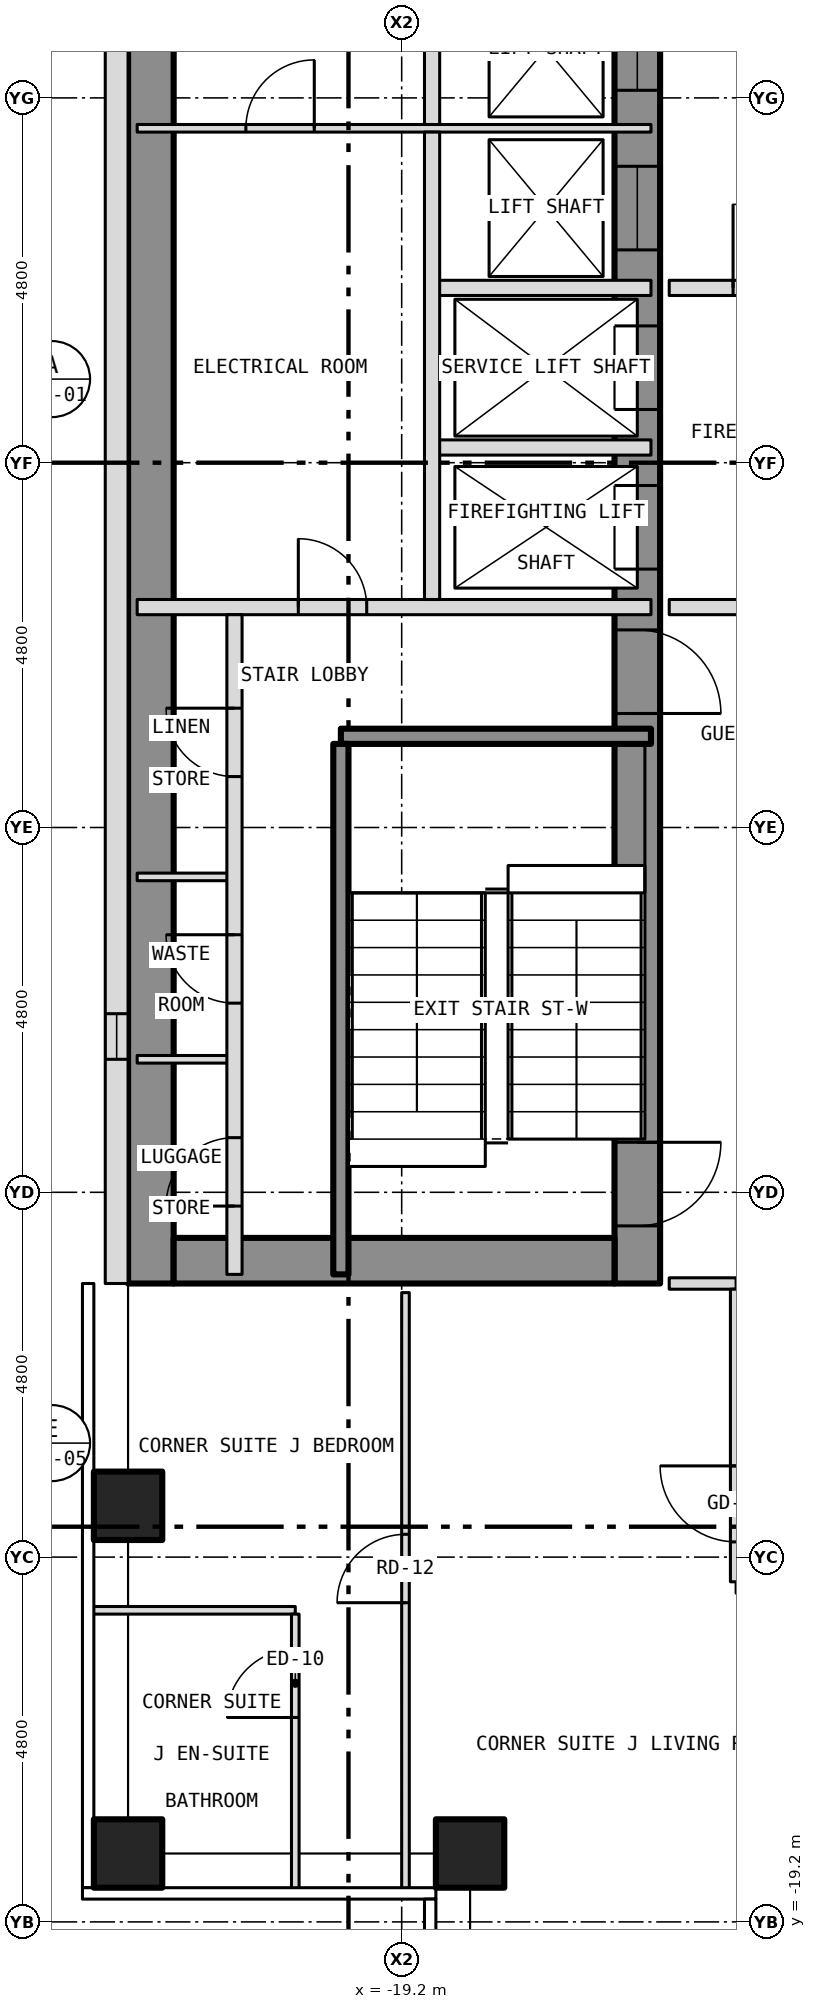
"""IFC4 building model, lengths in metres.
Left out: names, types, materials, properties, quantities, classifications, styles, units other than length and angle.
Written with IfcOpenShell. Run it as: python <this file> out.ifc"""

import sys

from ifc_helpers import new_model, si_unit, direction, frame, frame_2d, origin, origin_2d, place, context, subcontext, project, spatial, rectangle, hollow_rectangle, extrude, element, fill, save


model = new_model("IFC4")
c1 = context("Model", 3, precision=1e-05, world=origin(), true_north=direction((0.0, 1.0)))
c2 = subcontext(c1, "Body", "Model", "MODEL_VIEW")
j1 = project(units=[si_unit("LENGTHUNIT", "METRE"), si_unit("PLANEANGLEUNIT", "RADIAN")], contexts=[c1])
p1 = place(None, origin())
s1 = spatial("IfcSite", under=j1, at=p1, CompositionType="ELEMENT")
p2 = place(p1, origin())
s2 = spatial("IfcBuilding", under=s1, at=p2, CompositionType="ELEMENT")
p3 = place(p2, frame((0.0, 0.0, 96.0)))
s3 = spatial("IfcBuildingStorey", under=s2, at=p3, CompositionType="ELEMENT", Elevation=96.0)
for number, where, z_axis, x_axis in (
    (1, (-22.8, -18.3, -0.15), (0.0, 0.0, 1.0), (1.0, 0.0, 0.0)),
    (2, (-22.8, -13.725, -0.15), (0.0, 0.0, 1.0), (1.0, 0.0, 0.0)),
    (3, (-18.3, -18.3, -0.15), (0.0, 0.0, 1.0), (1.0, 0.0, 0.0)),
):
    element("IfcColumn", number, at=place(p3, frame(where, z_axis=z_axis, x_axis=x_axis)), inside=s3, PredefinedType="COLUMN", context=c2, shape_type="SweptSolid", body=[
        extrude(hollow_rectangle(XDim=0.9, YDim=0.9, WallThickness=0.05, at=origin_2d()), origin(), (0.0, 0.0, 1.0), 3.5),
    ])
p4 = place(p3, frame((-16.1, -10.8, 0.0), z_axis=(0.0, 0.0, 1.0), x_axis=(0.0, 1.0, 0.0)))
e4 = element("IfcWall", 4, at=p4, inside=s3, PredefinedType="SHEAR", context=c2, shape_type="SweptSolid", body=[
    extrude(rectangle(XDim=21.6, YDim=0.6, at=frame_2d((10.8, 0.0))), origin(), (0.0, 0.0, 1.0), 3.25),
])
p5 = place(p4, frame((9.4, 0.0, 0.0)))
e5 = element("IfcOpeningElement", 5, at=p5, cuts=e4, PredefinedType="OPENING", context=c2, shape_type="SweptSolid", body=[
    extrude(rectangle(XDim=1.1, YDim=2.1, at=frame_2d((0.55, 1.05))), frame((0.0, 0.312, 0.0), z_axis=(0.0, -1.0, 0.0), x_axis=(1.0, 0.0, 0.0)), (0.0, 0.0, 1.0), 0.624),
])
p6 = place(p4, frame((11.5, 0.0, 0.0)))
e6 = element("IfcOpeningElement", 6, at=p6, cuts=e4, PredefinedType="OPENING", context=c2, shape_type="SweptSolid", body=[
    extrude(rectangle(XDim=1.1, YDim=2.1, at=frame_2d((0.55, 1.05))), frame((0.0, 0.312, 0.0), z_axis=(0.0, -1.0, 0.0), x_axis=(1.0, 0.0, 0.0)), (0.0, 0.0, 1.0), 0.624),
])
p7 = place(p4, frame((13.6, 0.0, 0.0)))
e7 = element("IfcOpeningElement", 7, at=p7, cuts=e4, PredefinedType="OPENING", context=c2, shape_type="SweptSolid", body=[
    extrude(rectangle(XDim=1.1, YDim=2.1, at=frame_2d((0.55, 1.05))), frame((0.0, 0.312, 0.0), z_axis=(0.0, -1.0, 0.0), x_axis=(1.0, 0.0, 0.0)), (0.0, 0.0, 1.0), 0.624),
])
p8 = place(p4, frame((15.7, 0.0, 0.0)))
e8 = element("IfcOpeningElement", 8, at=p8, cuts=e4, PredefinedType="OPENING", context=c2, shape_type="SweptSolid", body=[
    extrude(rectangle(XDim=1.1, YDim=2.1, at=frame_2d((0.55, 1.05))), frame((0.0, 0.312, 0.0), z_axis=(0.0, -1.0, 0.0), x_axis=(1.0, 0.0, 0.0)), (0.0, 0.0, 1.0), 0.624),
])
p9 = place(p4, frame((17.8, 0.0, 0.0)))
e9 = element("IfcOpeningElement", 9, at=p9, cuts=e4, PredefinedType="OPENING", context=c2, shape_type="SweptSolid", body=[
    extrude(rectangle(XDim=1.1, YDim=2.1, at=frame_2d((0.55, 1.05))), frame((0.0, 0.312, 0.0), z_axis=(0.0, -1.0, 0.0), x_axis=(1.0, 0.0, 0.0)), (0.0, 0.0, 1.0), 0.624),
])
p10 = place(p4, frame((0.758, 0.0, 0.0)))
e10 = element("IfcOpeningElement", 10, at=p10, cuts=e4, PredefinedType="OPENING", context=c2, shape_type="SweptSolid", body=[
    extrude(rectangle(XDim=1.1, YDim=2.1, at=frame_2d((0.55, 1.05))), frame((0.0, 0.312, 0.0), z_axis=(0.0, -1.0, 0.0), x_axis=(1.0, 0.0, 0.0)), (0.0, 0.0, 1.0), 0.624),
])
p11 = place(p4, frame((7.5, 0.0, 0.0)))
e11 = element("IfcOpeningElement", 11, at=p11, cuts=e4, PredefinedType="OPENING", context=c2, shape_type="SweptSolid", body=[
    extrude(rectangle(XDim=1.1, YDim=2.1, at=frame_2d((0.55, 1.05))), frame((0.0, 0.312, 0.0), z_axis=(0.0, -1.0, 0.0), x_axis=(1.0, 0.0, 0.0)), (0.0, 0.0, 1.0), 0.624),
])
p12 = place(p3, frame((-22.5, -10.8, 0.0), z_axis=(0.0, 0.0, 1.0), x_axis=(0.0, 1.0, 0.0)))
e12 = element("IfcWall", 12, at=p12, inside=s3, PredefinedType="SHEAR", context=c2, shape_type="SweptSolid", body=[
    extrude(rectangle(XDim=21.6, YDim=0.6, at=frame_2d((10.8, 0.0))), origin(), (0.0, 0.0, 1.0), 3.25),
])
p13 = place(p3, frame((-22.2, -10.5, 0.0), z_axis=(0.0, 0.0, 1.0), x_axis=(1.0, 0.0, 0.0)))
e13 = element("IfcWall", 13, at=p13, inside=s3, PredefinedType="SHEAR", context=c2, shape_type="SweptSolid", body=[
    extrude(rectangle(XDim=5.8, YDim=0.6, at=frame_2d((2.9, 0.0))), origin(), (0.0, 0.0, 1.0), 3.25),
])
p14 = place(p3, frame((-22.95, 10.8, 0.0), z_axis=(0.0, 0.0, 1.0), x_axis=(0.0, -1.0, 0.0)))
e14 = element("IfcWall", 14, at=p14, inside=s3, PredefinedType="SOLIDWALL", context=c2, shape_type="SweptSolid", body=[
    extrude(rectangle(XDim=21.6, YDim=0.3, at=frame_2d((10.8, 0.0))), origin(), (0.0, 0.0, 1.0), 3.5),
])
p15 = place(p14, frame((18.05, 0.0, 1.0)))
e15 = element("IfcOpeningElement", 15, at=p15, cuts=e14, PredefinedType="OPENING", context=c2, shape_type="SweptSolid", body=[
    extrude(rectangle(XDim=0.6, YDim=1.5, at=frame_2d((0.3, 0.75))), frame((0.0, 0.162, 0.0), z_axis=(0.0, -1.0, 0.0), x_axis=(1.0, 0.0, 0.0)), (0.0, 0.0, 1.0), 0.324),
])
p16 = place(p3, frame((-23.28, -15.1, 0.0), z_axis=(0.0, 0.0, 1.0), x_axis=(1.0, 0.0, 0.0)))
e16 = element("IfcWall", 16, at=p16, inside=s3, PredefinedType="PARTITIONING", context=c2, shape_type="SweptSolid", body=[
    extrude(rectangle(XDim=2.68, YDim=0.1, at=frame_2d((1.34, 0.0))), origin(), (0.0, 0.0, 1.0), 3.35),
])
p17 = place(p3, frame((-15.68, -10.8, 0.0), z_axis=(0.0, 0.0, 1.0), x_axis=(1.0, 0.0, 0.0)))
e17 = element("IfcWall", 17, at=p17, inside=s3, PredefinedType="PARTITIONING", context=c2, shape_type="SweptSolid", body=[
    extrude(rectangle(XDim=0.88, YDim=0.15, at=frame_2d((0.44, 0.0))), origin(), (0.0, 0.0, 1.0), 3.35),
])
for number, where, z_axis, x_axis in (
    (18, (-22.68, -7.85, 0.0), (0.0, 0.0, 1.0), (1.0, 0.0, 0.0)),
    (19, (-22.68, -5.45, 0.0), (0.0, 0.0, 1.0), (1.0, 0.0, 0.0)),
):
    element("IfcWall", number, at=place(p3, frame(where, z_axis=z_axis, x_axis=x_axis)), inside=s3, PredefinedType="PARTITIONING", context=c2, shape_type="SweptSolid", body=[
        extrude(rectangle(XDim=1.28, YDim=0.1, at=frame_2d((0.64, 0.0))), origin(), (0.0, 0.0, 1.0), 3.25),
    ])
p18 = place(p3, frame((-20.0, -3.6, 0.0), z_axis=(0.0, 0.0, 1.0), x_axis=(1.0, 0.0, 0.0)))
e20 = element("IfcWall", 20, at=p18, inside=s3, PredefinedType="SHEAR", context=c2, shape_type="SweptSolid", body=[
    extrude(rectangle(XDim=4.08, YDim=0.2, at=frame_2d((2.04, 0.0))), origin(), (0.0, 0.0, 1.0), 3.25),
])
p19 = place(p3, frame((-22.68, -1.9, 0.0), z_axis=(0.0, 0.0, 1.0), x_axis=(1.0, 0.0, 0.0)))
e21 = element("IfcWall", 21, at=p19, inside=s3, PredefinedType="PARTITIONING", context=c2, shape_type="SweptSolid", body=[
    extrude(rectangle(XDim=6.76, YDim=0.2, at=frame_2d((3.38, 0.0))), origin(), (0.0, 0.0, 1.0), 3.25),
])
p20 = place(p19, frame((2.12, 0.0, 0.0)))
e22 = element("IfcOpeningElement", 22, at=p20, cuts=e21, PredefinedType="OPENING", context=c2, shape_type="SweptSolid", body=[
    extrude(rectangle(XDim=0.9, YDim=2.1, at=frame_2d((0.45, 1.05))), frame((0.0, 0.112, 0.0), z_axis=(0.0, -1.0, 0.0), x_axis=(1.0, 0.0, 0.0)), (0.0, 0.0, 1.0), 0.224),
])
p21 = place(p3, frame((-15.68, -1.9, 0.0), z_axis=(0.0, 0.0, 1.0), x_axis=(1.0, 0.0, 0.0)))
e23 = element("IfcWall", 23, at=p21, inside=s3, PredefinedType="PARTITIONING", context=c2, shape_type="SweptSolid", body=[
    extrude(rectangle(XDim=3.28, YDim=0.2, at=frame_2d((1.64, 0.0))), origin(), (0.0, 0.0, 1.0), 3.35),
])
p22 = place(p21, frame((0.94, 0.0, 0.0)))
e24 = element("IfcOpeningElement", 24, at=p22, cuts=e23, PredefinedType="OPENING", context=c2, shape_type="SweptSolid", body=[
    extrude(rectangle(XDim=1.1, YDim=2.1, at=frame_2d((0.55, 1.05))), frame((0.0, 0.112, 0.0), z_axis=(0.0, -1.0, 0.0), x_axis=(1.0, 0.0, 0.0)), (0.0, 0.0, 1.0), 0.224),
])
for number, where, z_axis, x_axis in (
    (25, (-18.8, 0.2, 0.0), (0.0, 0.0, 1.0), (1.0, 0.0, 0.0)),
    (26, (-18.8, 2.3, 0.0), (0.0, 0.0, 1.0), (1.0, 0.0, 0.0)),
):
    element("IfcWall", number, at=place(p3, frame(where, z_axis=z_axis, x_axis=x_axis)), inside=s3, PredefinedType="PARTITIONING", context=c2, shape_type="SweptSolid", body=[
        extrude(rectangle(XDim=2.88, YDim=0.2, at=frame_2d((1.44, 0.0))), origin(), (0.0, 0.0, 1.0), 3.25),
    ])
p23 = place(p3, frame((-15.68, 2.3, 0.0), z_axis=(0.0, 0.0, 1.0), x_axis=(1.0, 0.0, 0.0)))
e27 = element("IfcWall", 27, at=p23, inside=s3, PredefinedType="PARTITIONING", context=c2, shape_type="SweptSolid", body=[
    extrude(rectangle(XDim=3.28, YDim=0.2, at=frame_2d((1.64, 0.0))), origin(), (0.0, 0.0, 1.0), 3.35),
])
p24 = place(p23, frame((0.84, 0.0, 0.0)))
e28 = element("IfcOpeningElement", 28, at=p24, cuts=e27, PredefinedType="OPENING", context=c2, shape_type="SweptSolid", body=[
    extrude(rectangle(XDim=1.1, YDim=2.1, at=frame_2d((0.55, 1.05))), frame((0.0, 0.112, 0.0), z_axis=(0.0, -1.0, 0.0), x_axis=(1.0, 0.0, 0.0)), (0.0, 0.0, 1.0), 0.224),
])
p25 = place(p3, frame((-22.68, 4.4, 0.0), z_axis=(0.0, 0.0, 1.0), x_axis=(1.0, 0.0, 0.0)))
e29 = element("IfcWall", 29, at=p25, inside=s3, PredefinedType="PARTITIONING", context=c2, shape_type="SweptSolid", body=[
    extrude(rectangle(XDim=6.76, YDim=0.1, at=frame_2d((3.38, 0.0))), origin(), (0.0, 0.0, 1.0), 3.25),
])
p26 = place(p25, frame((1.43, 0.0, 0.0)))
e30 = element("IfcOpeningElement", 30, at=p26, cuts=e29, PredefinedType="OPENING", context=c2, shape_type="SweptSolid", body=[
    extrude(rectangle(XDim=0.9, YDim=2.1, at=frame_2d((0.45, 1.05))), frame((0.0, 0.062, 0.0), z_axis=(0.0, -1.0, 0.0), x_axis=(1.0, 0.0, 0.0)), (0.0, 0.0, 1.0), 0.124),
])
p27 = place(p3, frame((-21.4, -10.68, 0.0), z_axis=(0.0, 0.0, 1.0), x_axis=(0.0, 1.0, 0.0)))
e31 = element("IfcWall", 31, at=p27, inside=s3, PredefinedType="PARTITIONING", context=c2, shape_type="SweptSolid", body=[
    extrude(rectangle(XDim=8.68, YDim=0.2, at=frame_2d((4.34, 0.0))), origin(), (0.0, 0.0, 1.0), 3.25),
])
p28 = place(p27, frame((0.899, 0.0, 0.0)))
e32 = element("IfcOpeningElement", 32, at=p28, cuts=e31, PredefinedType="OPENING", context=c2, shape_type="SweptSolid", body=[
    extrude(rectangle(XDim=0.9, YDim=2.1, at=frame_2d((0.45, 1.05))), frame((0.0, 0.112, 0.0), z_axis=(0.0, -1.0, 0.0), x_axis=(1.0, 0.0, 0.0)), (0.0, 0.0, 1.0), 0.224),
])
p29 = place(p27, frame((3.569, 0.0, 0.0)))
e33 = element("IfcOpeningElement", 33, at=p29, cuts=e31, PredefinedType="OPENING", context=c2, shape_type="SweptSolid", body=[
    extrude(rectangle(XDim=0.9, YDim=2.1, at=frame_2d((0.45, 1.05))), frame((0.0, 0.112, 0.0), z_axis=(0.0, -1.0, 0.0), x_axis=(1.0, 0.0, 0.0)), (0.0, 0.0, 1.0), 0.224),
])
p30 = place(p27, frame((6.55, 0.0, 0.0)))
e34 = element("IfcOpeningElement", 34, at=p30, cuts=e31, PredefinedType="OPENING", context=c2, shape_type="SweptSolid", body=[
    extrude(rectangle(XDim=0.9, YDim=2.1, at=frame_2d((0.45, 1.05))), frame((0.0, 0.112, 0.0), z_axis=(0.0, -1.0, 0.0), x_axis=(1.0, 0.0, 0.0)), (0.0, 0.0, 1.0), 0.224),
])
p31 = place(p3, frame((-20.6, -18.78, 0.0), z_axis=(0.0, 0.0, 1.0), x_axis=(0.0, 1.0, 0.0)))
e35 = element("IfcWall", 35, at=p31, inside=s3, PredefinedType="PARTITIONING", context=c2, shape_type="SweptSolid", body=[
    extrude(rectangle(XDim=3.63, YDim=0.1, at=frame_2d((1.815, 0.0))), origin(), (0.0, 0.0, 1.0), 3.35),
])
p32 = place(p31, frame((2.27, 0.0, 0.0)))
e36 = element("IfcOpeningElement", 36, at=p32, cuts=e35, PredefinedType="OPENING", context=c2, shape_type="SweptSolid", body=[
    extrude(rectangle(XDim=0.9, YDim=2.1, at=frame_2d((0.45, 1.05))), frame((0.0, 0.062, 0.0), z_axis=(0.0, -1.0, 0.0), x_axis=(1.0, 0.0, 0.0)), (0.0, 0.0, 1.0), 0.124),
])
p33 = place(p3, frame((-20.0, -10.68, 0.0), z_axis=(0.0, 0.0, 1.0), x_axis=(0.0, 1.0, 0.0)))
e37 = element("IfcWall", 37, at=p33, inside=s3, PredefinedType="SHEAR", context=c2, shape_type="SweptSolid", body=[
    extrude(rectangle(XDim=6.98, YDim=0.2, at=frame_2d((3.49, 0.0))), origin(), (0.0, 0.0, 1.0), 3.25),
])
p34 = place(p3, frame((-19.15, -18.78, 0.0), z_axis=(0.0, 0.0, 1.0), x_axis=(0.0, 1.0, 0.0)))
e38 = element("IfcWall", 38, at=p34, inside=s3, PredefinedType="PARTITIONING", context=c2, shape_type="SweptSolid", body=[
    extrude(rectangle(XDim=7.86, YDim=0.1, at=frame_2d((3.93, 0.0))), origin(), (0.0, 0.0, 1.0), 2.817),
])
p35 = place(p34, frame((3.78, 0.0, 0.0)))
e39 = element("IfcOpeningElement", 39, at=p35, cuts=e38, PredefinedType="OPENING", context=c2, shape_type="SweptSolid", body=[
    extrude(rectangle(XDim=0.9, YDim=2.1, at=frame_2d((0.45, 1.05))), frame((0.0, 0.062, 0.0), z_axis=(0.0, -1.0, 0.0), x_axis=(1.0, 0.0, 0.0)), (0.0, 0.0, 1.0), 0.124),
])
p36 = place(p3, frame((-18.8, -1.8, 0.0), z_axis=(0.0, 0.0, 1.0), x_axis=(0.0, 1.0, 0.0)))
e40 = element("IfcWall", 40, at=p36, inside=s3, PredefinedType="PARTITIONING", context=c2, shape_type="SweptSolid", body=[
    extrude(rectangle(XDim=6.15, YDim=0.2, at=frame_2d((3.075, 0.0))), origin(), (0.0, 0.0, 1.0), 3.25),
])
p37 = place(p3, frame((-18.8, 4.45, 0.0), z_axis=(0.0, 0.0, 1.0), x_axis=(0.0, 1.0, 0.0)))
e41 = element("IfcWall", 41, at=p37, inside=s3, PredefinedType="PARTITIONING", context=c2, shape_type="SweptSolid", body=[
    extrude(rectangle(XDim=6.23, YDim=0.2, at=frame_2d((3.115, 0.0))), origin(), (0.0, 0.0, 1.0), 3.25),
])
p38 = place(p3, frame((-14.8, -14.725, 0.0), z_axis=(0.0, 0.0, 1.0), x_axis=(0.0, 1.0, 0.0)))
e42 = element("IfcWall", 42, at=p38, inside=s3, PredefinedType="PARTITIONING", context=c2, shape_type="SweptSolid", body=[
    extrude(rectangle(XDim=3.85, YDim=0.15, at=frame_2d((1.925, 0.0))), origin(), (0.0, 0.0, 1.0), 3.35),
])
p39 = place(p38, frame((0.525, 0.0, 0.0)))
e43 = element("IfcOpeningElement", 43, at=p39, cuts=e42, PredefinedType="OPENING", context=c2, shape_type="SweptSolid", body=[
    extrude(rectangle(XDim=1.0, YDim=2.1, at=frame_2d((0.5, 1.05))), frame((0.0, 0.087, 0.0), z_axis=(0.0, -1.0, 0.0), x_axis=(1.0, 0.0, 0.0)), (0.0, 0.0, 1.0), 0.174),
])
p40 = place(p15, origin())
e44 = element("IfcWindow", 44, at=p40, inside=s3, PartitioningType="SINGLE_PANEL", PredefinedType="WINDOW", context=c2, shape_type="SweptSolid", body=[
    extrude(rectangle(XDim=0.6, YDim=1.5, at=frame_2d((0.3, 0.75))), frame((0.0, -0.06, 0.0), z_axis=(0.0, -1.0, 0.0), x_axis=(1.0, 0.0, 0.0)), (0.0, 0.0, 1.0), 0.06),
])
fill(e15, e44)
p41 = place(p5, origin())
e45 = element("IfcDoor", 45, at=p41, inside=s3, OperationType="SLIDING_TO_LEFT", PredefinedType="DOOR", context=c2, shape_type="SweptSolid", body=[
    extrude(rectangle(XDim=1.1, YDim=2.1, at=frame_2d((0.55, 1.05))), frame((0.0, 0.025, 0.0), z_axis=(0.0, -1.0, 0.0), x_axis=(1.0, 0.0, 0.0)), (0.0, 0.0, 1.0), 0.05),
])
fill(e5, e45)
p42 = place(p6, origin())
e46 = element("IfcDoor", 46, at=p42, inside=s3, OperationType="SLIDING_TO_LEFT", PredefinedType="DOOR", context=c2, shape_type="SweptSolid", body=[
    extrude(rectangle(XDim=1.1, YDim=2.1, at=frame_2d((0.55, 1.05))), frame((0.0, 0.025, 0.0), z_axis=(0.0, -1.0, 0.0), x_axis=(1.0, 0.0, 0.0)), (0.0, 0.0, 1.0), 0.05),
])
fill(e6, e46)
p43 = place(p7, origin())
e47 = element("IfcDoor", 47, at=p43, inside=s3, OperationType="SLIDING_TO_LEFT", PredefinedType="DOOR", context=c2, shape_type="SweptSolid", body=[
    extrude(rectangle(XDim=1.1, YDim=2.1, at=frame_2d((0.55, 1.05))), frame((0.0, 0.025, 0.0), z_axis=(0.0, -1.0, 0.0), x_axis=(1.0, 0.0, 0.0)), (0.0, 0.0, 1.0), 0.05),
])
fill(e7, e47)
p44 = place(p8, origin())
e48 = element("IfcDoor", 48, at=p44, inside=s3, OperationType="SLIDING_TO_LEFT", PredefinedType="DOOR", context=c2, shape_type="SweptSolid", body=[
    extrude(rectangle(XDim=1.1, YDim=2.1, at=frame_2d((0.55, 1.05))), frame((0.0, 0.025, 0.0), z_axis=(0.0, -1.0, 0.0), x_axis=(1.0, 0.0, 0.0)), (0.0, 0.0, 1.0), 0.05),
])
fill(e8, e48)
p45 = place(p10, origin())
e49 = element("IfcDoor", 49, at=p45, inside=s3, OperationType="SINGLE_SWING_RIGHT", PredefinedType="DOOR", context=c2, shape_type="SweptSolid", body=[
    extrude(rectangle(XDim=1.1, YDim=2.1, at=frame_2d((0.55, 1.05))), frame((0.0, 0.025, 0.0), z_axis=(0.0, -1.0, 0.0), x_axis=(1.0, 0.0, 0.0)), (0.0, 0.0, 1.0), 0.05),
])
fill(e10, e49)
p46 = place(p11, origin())
e50 = element("IfcDoor", 50, at=p46, inside=s3, OperationType="SINGLE_SWING_LEFT", PredefinedType="DOOR", context=c2, shape_type="SweptSolid", body=[
    extrude(rectangle(XDim=1.1, YDim=2.1, at=frame_2d((0.55, 1.05))), frame((0.0, 0.025, 0.0), z_axis=(0.0, -1.0, 0.0), x_axis=(1.0, 0.0, 0.0)), (0.0, 0.0, 1.0), 0.05),
])
fill(e11, e50)
p47 = place(p28, origin())
e51 = element("IfcDoor", 51, at=p47, inside=s3, OperationType="SINGLE_SWING_LEFT", PredefinedType="DOOR", context=c2, shape_type="SweptSolid", body=[
    extrude(rectangle(XDim=0.9, YDim=2.1, at=frame_2d((0.45, 1.05))), frame((0.0, 0.025, 0.0), z_axis=(0.0, -1.0, 0.0), x_axis=(1.0, 0.0, 0.0)), (0.0, 0.0, 1.0), 0.05),
])
fill(e32, e51)
p48 = place(p29, origin())
e52 = element("IfcDoor", 52, at=p48, inside=s3, OperationType="SINGLE_SWING_RIGHT", PredefinedType="DOOR", context=c2, shape_type="SweptSolid", body=[
    extrude(rectangle(XDim=0.9, YDim=2.1, at=frame_2d((0.45, 1.05))), frame((0.0, 0.025, 0.0), z_axis=(0.0, -1.0, 0.0), x_axis=(1.0, 0.0, 0.0)), (0.0, 0.0, 1.0), 0.05),
])
fill(e33, e52)
p49 = place(p30, origin())
e53 = element("IfcDoor", 53, at=p49, inside=s3, OperationType="SINGLE_SWING_RIGHT", PredefinedType="DOOR", context=c2, shape_type="SweptSolid", body=[
    extrude(rectangle(XDim=0.9, YDim=2.1, at=frame_2d((0.45, 1.05))), frame((0.0, 0.025, 0.0), z_axis=(0.0, -1.0, 0.0), x_axis=(1.0, 0.0, 0.0)), (0.0, 0.0, 1.0), 0.05),
])
fill(e34, e53)
p50 = place(p20, origin())
e54 = element("IfcDoor", 54, at=p50, inside=s3, OperationType="SINGLE_SWING_LEFT", PredefinedType="DOOR", context=c2, shape_type="SweptSolid", body=[
    extrude(rectangle(XDim=0.9, YDim=2.1, at=frame_2d((0.45, 1.05))), frame((0.0, 0.025, 0.0), z_axis=(0.0, -1.0, 0.0), x_axis=(1.0, 0.0, 0.0)), (0.0, 0.0, 1.0), 0.05),
])
fill(e22, e54)
p51 = place(p26, origin())
e55 = element("IfcDoor", 55, at=p51, inside=s3, OperationType="SINGLE_SWING_RIGHT", PredefinedType="DOOR", context=c2, shape_type="SweptSolid", body=[
    extrude(rectangle(XDim=0.9, YDim=2.1, at=frame_2d((0.45, 1.05))), frame((0.0, 0.025, 0.0), z_axis=(0.0, -1.0, 0.0), x_axis=(1.0, 0.0, 0.0)), (0.0, 0.0, 1.0), 0.05),
])
fill(e30, e55)
p52 = place(p24, origin())
e56 = element("IfcDoor", 56, at=p52, inside=s3, OperationType="SINGLE_SWING_LEFT", PredefinedType="DOOR", context=c2, shape_type="SweptSolid", body=[
    extrude(rectangle(XDim=1.1, YDim=2.1, at=frame_2d((0.55, 1.05))), frame((0.0, 0.025, 0.0), z_axis=(0.0, -1.0, 0.0), x_axis=(1.0, 0.0, 0.0)), (0.0, 0.0, 1.0), 0.05),
])
fill(e28, e56)
p53 = place(p39, origin())
e57 = element("IfcDoor", 57, at=p53, inside=s3, OperationType="SINGLE_SWING_RIGHT", PredefinedType="DOOR", context=c2, shape_type="SweptSolid", body=[
    extrude(rectangle(XDim=1.0, YDim=2.1, at=frame_2d((0.5, 1.05))), frame((0.0, 0.025, 0.0), z_axis=(0.0, -1.0, 0.0), x_axis=(1.0, 0.0, 0.0)), (0.0, 0.0, 1.0), 0.05),
])
fill(e43, e57)
p54 = place(p35, origin())
e58 = element("IfcDoor", 58, at=p54, inside=s3, OperationType="SINGLE_SWING_LEFT", PredefinedType="DOOR", context=c2, shape_type="SweptSolid", body=[
    extrude(rectangle(XDim=0.9, YDim=2.1, at=frame_2d((0.45, 1.05))), frame((0.0, 0.025, 0.0), z_axis=(0.0, -1.0, 0.0), x_axis=(1.0, 0.0, 0.0)), (0.0, 0.0, 1.0), 0.05),
])
fill(e39, e58)
p55 = place(p32, origin())
e59 = element("IfcDoor", 59, at=p55, inside=s3, OperationType="SINGLE_SWING_LEFT", PredefinedType="DOOR", context=c2, shape_type="SweptSolid", body=[
    extrude(rectangle(XDim=0.9, YDim=2.1, at=frame_2d((0.45, 1.05))), frame((0.0, 0.025, 0.0), z_axis=(0.0, -1.0, 0.0), x_axis=(1.0, 0.0, 0.0)), (0.0, 0.0, 1.0), 0.05),
])
fill(e36, e59)
save(model, sys.argv[1])
